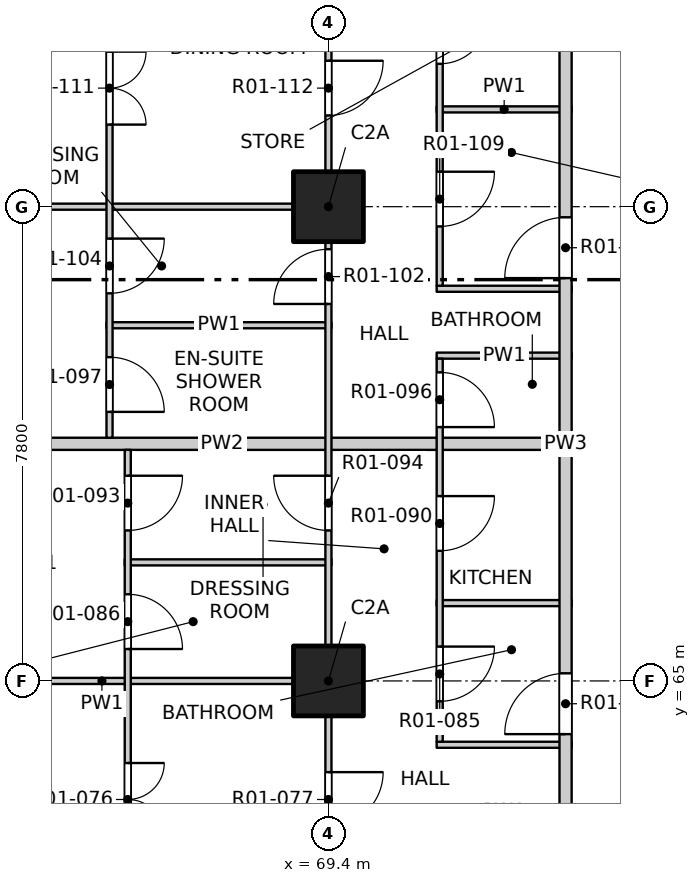
"""IFC4 building model, lengths in metres.
Left out: names, types, materials, properties, quantities, classifications, styles, units other than length and angle.
Written with IfcOpenShell. Run it as: python <this file> out.ifc"""

import sys

from ifc_helpers import new_model, si_unit, direction, frame, frame_2d, origin, origin_2d, place, context, subcontext, project, spatial, rectangle, extrude, element, fill, save


model = new_model("IFC4")
c1 = context("Model", 3, precision=1e-05, world=origin(), true_north=direction((0.0, 1.0)))
c2 = subcontext(c1, "Body", "Model", "MODEL_VIEW")
j1 = project(units=[si_unit("LENGTHUNIT", "METRE"), si_unit("PLANEANGLEUNIT", "RADIAN")], contexts=[c1])
p1 = place(None, origin())
s1 = spatial("IfcSite", under=j1, at=p1, CompositionType="ELEMENT")
p2 = place(p1, origin())
s2 = spatial("IfcBuilding", under=s1, at=p2, CompositionType="ELEMENT")
p3 = place(p2, frame((0.0, 0.0, 26.3)))
s3 = spatial("IfcBuildingStorey", under=s2, at=p3, CompositionType="ELEMENT", Elevation=26.3)
for number, where, z_axis, x_axis in (
    (1, (69.4, 65.0, -0.25), (0.0, 0.0, 1.0), (1.0, 0.0, 0.0)),
    (2, (69.4, 72.8, -0.25), (0.0, 0.0, 1.0), (1.0, 0.0, 0.0)),
):
    element("IfcColumn", number, at=place(p3, frame(where, z_axis=z_axis, x_axis=x_axis)), inside=s3, PredefinedType="COLUMN", context=c2, shape_type="SweptSolid", body=[
        extrude(rectangle(XDim=1.15, YDim=1.15, at=origin_2d()), origin(), (0.0, 0.0, 1.0), 3.4),
    ])
p4 = place(p3, frame((71.18, 63.95, 0.0), z_axis=(0.0, 0.0, 1.0), x_axis=(1.0, 0.0, 0.0)))
e3 = element("IfcWall", 3, at=p4, inside=s3, PredefinedType="PARTITIONING", context=c2, shape_type="SweptSolid", body=[
    extrude(rectangle(XDim=2.22, YDim=0.1, at=frame_2d((1.11, 0.0))), origin(), (0.0, 0.0, 1.0), 3.15),
])
p5 = place(p3, frame((61.9, 65.0, 0.0), z_axis=(0.0, 0.0, 1.0), x_axis=(1.0, 0.0, 0.0)))
e4 = element("IfcWall", 4, at=p5, inside=s3, PredefinedType="PARTITIONING", context=c2, shape_type="SweptSolid", body=[
    extrude(rectangle(XDim=7.55, YDim=0.1, at=frame_2d((3.775, 0.0))), origin(), (0.0, 0.0, 1.0), 2.55),
])
p6 = place(p3, frame((71.18, 66.28, 0.0), z_axis=(0.0, 0.0, 1.0), x_axis=(1.0, 0.0, 0.0)))
e5 = element("IfcWall", 5, at=p6, inside=s3, PredefinedType="PARTITIONING", context=c2, shape_type="SweptSolid", body=[
    extrude(rectangle(XDim=2.22, YDim=0.1, at=frame_2d((1.11, 0.0))), origin(), (0.0, 0.0, 1.0), 3.15),
])
p7 = place(p3, frame((66.05, 66.95, 0.0), z_axis=(0.0, 0.0, 1.0), x_axis=(1.0, 0.0, 0.0)))
e6 = element("IfcWall", 6, at=p7, inside=s3, PredefinedType="PARTITIONING", context=c2, shape_type="SweptSolid", body=[
    extrude(rectangle(XDim=3.4, YDim=0.1, at=frame_2d((1.7, 0.0))), origin(), (0.0, 0.0, 1.0), 3.15),
])
p8 = place(p3, frame((61.9, 68.9, 0.0), z_axis=(0.0, 0.0, 1.0), x_axis=(1.0, 0.0, 0.0)))
e7 = element("IfcWall", 7, at=p8, inside=s3, PredefinedType="PARTITIONING", context=c2, shape_type="SweptSolid", body=[
    extrude(rectangle(XDim=11.5, YDim=0.2, at=frame_2d((5.75, 0.0))), origin(), (0.0, 0.0, 1.0), 3.15),
])
p9 = place(p3, frame((71.18, 70.35, 0.0), z_axis=(0.0, 0.0, 1.0), x_axis=(1.0, 0.0, 0.0)))
e8 = element("IfcWall", 8, at=p9, inside=s3, PredefinedType="PARTITIONING", context=c2, shape_type="SweptSolid", body=[
    extrude(rectangle(XDim=2.22, YDim=0.1, at=frame_2d((1.11, 0.0))), origin(), (0.0, 0.0, 1.0), 3.15),
])
p10 = place(p3, frame((65.75, 70.85, 0.0), z_axis=(0.0, 0.0, 1.0), x_axis=(1.0, 0.0, 0.0)))
e9 = element("IfcWall", 9, at=p10, inside=s3, PredefinedType="PARTITIONING", context=c2, shape_type="SweptSolid", body=[
    extrude(rectangle(XDim=3.7, YDim=0.1, at=frame_2d((1.85, 0.0))), origin(), (0.0, 0.0, 1.0), 3.15),
])
p11 = place(p3, frame((71.18, 71.45, 0.0), z_axis=(0.0, 0.0, 1.0), x_axis=(1.0, 0.0, 0.0)))
e10 = element("IfcWall", 10, at=p11, inside=s3, PredefinedType="PARTITIONING", context=c2, shape_type="SweptSolid", body=[
    extrude(rectangle(XDim=2.22, YDim=0.1, at=frame_2d((1.11, 0.0))), origin(), (0.0, 0.0, 1.0), 3.15),
])
p12 = place(p3, frame((61.9, 72.8, 0.0), z_axis=(0.0, 0.0, 1.0), x_axis=(1.0, 0.0, 0.0)))
e11 = element("IfcWall", 11, at=p12, inside=s3, PredefinedType="PARTITIONING", context=c2, shape_type="SweptSolid", body=[
    extrude(rectangle(XDim=7.55, YDim=0.1, at=frame_2d((3.775, 0.0))), origin(), (0.0, 0.0, 1.0), 2.55),
])
p13 = place(p3, frame((71.18, 74.4, 0.0), z_axis=(0.0, 0.0, 1.0), x_axis=(1.0, 0.0, 0.0)))
e12 = element("IfcWall", 12, at=p13, inside=s3, PredefinedType="PARTITIONING", context=c2, shape_type="SweptSolid", body=[
    extrude(rectangle(XDim=2.22, YDim=0.1, at=frame_2d((1.11, 0.0))), origin(), (0.0, 0.0, 1.0), 3.15),
])
p14 = place(p3, frame((65.8, 69.0, 0.0), z_axis=(0.0, 0.0, 1.0), x_axis=(0.0, 1.0, 0.0)))
e13 = element("IfcWall", 13, at=p14, inside=s3, PredefinedType="PARTITIONING", context=c2, shape_type="SweptSolid", body=[
    extrude(rectangle(XDim=7.6, YDim=0.1, at=frame_2d((3.8, 0.0))), origin(), (0.0, 0.0, 1.0), 3.15),
])
p15 = place(p14, frame((0.425, 0.0, 0.0)))
e14 = element("IfcOpeningElement", 14, at=p15, cuts=e13, PredefinedType="OPENING", context=c2, shape_type="SweptSolid", body=[
    extrude(rectangle(XDim=0.9, YDim=2.1, at=frame_2d((0.45, 1.05))), frame((0.0, 0.06, 0.0), z_axis=(0.0, -1.0, 0.0), x_axis=(1.0, 0.0, 0.0)), (0.0, 0.0, 1.0), 0.12),
])
p16 = place(p14, frame((2.375, 0.0, 0.0)))
e15 = element("IfcOpeningElement", 15, at=p16, cuts=e13, PredefinedType="OPENING", context=c2, shape_type="SweptSolid", body=[
    extrude(rectangle(XDim=0.9, YDim=2.1, at=frame_2d((0.45, 1.05))), frame((0.0, 0.06, 0.0), z_axis=(0.0, -1.0, 0.0), x_axis=(1.0, 0.0, 0.0)), (0.0, 0.0, 1.0), 0.12),
])
p17 = place(p14, frame((5.15, 0.0, 0.0)))
e16 = element("IfcOpeningElement", 16, at=p17, cuts=e13, PredefinedType="OPENING", context=c2, shape_type="SweptSolid", body=[
    extrude(rectangle(XDim=1.2, YDim=2.1, at=frame_2d((0.6, 1.05))), frame((0.0, 0.06, 0.0), z_axis=(0.0, -1.0, 0.0), x_axis=(1.0, 0.0, 0.0)), (0.0, 0.0, 1.0), 0.12),
])
p18 = place(p3, frame((66.1, 61.2, 0.0), z_axis=(0.0, 0.0, 1.0), x_axis=(0.0, 1.0, 0.0)))
e17 = element("IfcWall", 17, at=p18, inside=s3, PredefinedType="PARTITIONING", context=c2, shape_type="SweptSolid", body=[
    extrude(rectangle(XDim=7.6, YDim=0.1, at=frame_2d((3.8, 0.0))), origin(), (0.0, 0.0, 1.0), 3.15),
])
p19 = place(p18, frame((1.25, 0.0, 0.0)))
e18 = element("IfcOpeningElement", 18, at=p19, cuts=e17, PredefinedType="OPENING", context=c2, shape_type="SweptSolid", body=[
    extrude(rectangle(XDim=1.2, YDim=2.1, at=frame_2d((0.6, 1.05))), frame((0.0, 0.06, 0.0), z_axis=(0.0, -1.0, 0.0), x_axis=(1.0, 0.0, 0.0)), (0.0, 0.0, 1.0), 0.12),
])
p20 = place(p18, frame((4.325, 0.0, 0.0)))
e19 = element("IfcOpeningElement", 19, at=p20, cuts=e17, PredefinedType="OPENING", context=c2, shape_type="SweptSolid", body=[
    extrude(rectangle(XDim=0.9, YDim=2.1, at=frame_2d((0.45, 1.05))), frame((0.0, 0.06, 0.0), z_axis=(0.0, -1.0, 0.0), x_axis=(1.0, 0.0, 0.0)), (0.0, 0.0, 1.0), 0.12),
])
p21 = place(p18, frame((6.275, 0.0, 0.0)))
e20 = element("IfcOpeningElement", 20, at=p21, cuts=e17, PredefinedType="OPENING", context=c2, shape_type="SweptSolid", body=[
    extrude(rectangle(XDim=0.9, YDim=2.1, at=frame_2d((0.45, 1.05))), frame((0.0, 0.06, 0.0), z_axis=(0.0, -1.0, 0.0), x_axis=(1.0, 0.0, 0.0)), (0.0, 0.0, 1.0), 0.12),
])
p22 = place(p3, frame((69.4, 49.4, 0.0), z_axis=(0.0, 0.0, 1.0), x_axis=(0.0, 1.0, 0.0)))
e21 = element("IfcWall", 21, at=p22, inside=s3, PredefinedType="PARTITIONING", context=c2, shape_type="SweptSolid", body=[
    extrude(rectangle(XDim=31.2, YDim=0.1, at=frame_2d((15.6, 0.0))), origin(), (0.0, 0.0, 1.0), 3.15),
])
p23 = place(p22, frame((1.5, 0.0, 0.0)))
e22 = element("IfcOpeningElement", 22, at=p23, cuts=e21, PredefinedType="OPENING", context=c2, shape_type="SweptSolid", body=[
    extrude(rectangle(XDim=0.9, YDim=2.1, at=frame_2d((0.45, 1.05))), frame((0.0, 0.06, 0.0), z_axis=(0.0, -1.0, 0.0), x_axis=(1.0, 0.0, 0.0)), (0.0, 0.0, 1.0), 0.12),
])
p24 = place(p22, frame((6.225, 0.0, 0.0)))
e23 = element("IfcOpeningElement", 23, at=p24, cuts=e21, PredefinedType="OPENING", context=c2, shape_type="SweptSolid", body=[
    extrude(rectangle(XDim=0.9, YDim=2.1, at=frame_2d((0.45, 1.05))), frame((0.0, 0.06, 0.0), z_axis=(0.0, -1.0, 0.0), x_axis=(1.0, 0.0, 0.0)), (0.0, 0.0, 1.0), 0.12),
])
p25 = place(p22, frame((10.275, 0.0, 0.0)))
e24 = element("IfcOpeningElement", 24, at=p25, cuts=e21, PredefinedType="OPENING", context=c2, shape_type="SweptSolid", body=[
    extrude(rectangle(XDim=0.9, YDim=2.1, at=frame_2d((0.45, 1.05))), frame((0.0, 0.06, 0.0), z_axis=(0.0, -1.0, 0.0), x_axis=(1.0, 0.0, 0.0)), (0.0, 0.0, 1.0), 0.12),
])
p26 = place(p22, frame((13.2, 0.0, 0.0)))
e25 = element("IfcOpeningElement", 25, at=p26, cuts=e21, PredefinedType="OPENING", context=c2, shape_type="SweptSolid", body=[
    extrude(rectangle(XDim=0.9, YDim=2.1, at=frame_2d((0.45, 1.05))), frame((0.0, 0.06, 0.0), z_axis=(0.0, -1.0, 0.0), x_axis=(1.0, 0.0, 0.0)), (0.0, 0.0, 1.0), 0.12),
])
p27 = place(p22, frame((18.075, 0.0, 0.0)))
e26 = element("IfcOpeningElement", 26, at=p27, cuts=e21, PredefinedType="OPENING", context=c2, shape_type="SweptSolid", body=[
    extrude(rectangle(XDim=0.9, YDim=2.1, at=frame_2d((0.45, 1.05))), frame((0.0, 0.06, 0.0), z_axis=(0.0, -1.0, 0.0), x_axis=(1.0, 0.0, 0.0)), (0.0, 0.0, 1.0), 0.12),
])
p28 = place(p22, frame((21.8, 0.0, 0.0)))
e27 = element("IfcOpeningElement", 27, at=p28, cuts=e21, PredefinedType="OPENING", context=c2, shape_type="SweptSolid", body=[
    extrude(rectangle(XDim=0.9, YDim=2.1, at=frame_2d((0.45, 1.05))), frame((0.0, 0.06, 0.0), z_axis=(0.0, -1.0, 0.0), x_axis=(1.0, 0.0, 0.0)), (0.0, 0.0, 1.0), 0.12),
])
p29 = place(p22, frame((24.9, 0.0, 0.0)))
e28 = element("IfcOpeningElement", 28, at=p29, cuts=e21, PredefinedType="OPENING", context=c2, shape_type="SweptSolid", body=[
    extrude(rectangle(XDim=0.9, YDim=2.1, at=frame_2d((0.45, 1.05))), frame((0.0, 0.06, 0.0), z_axis=(0.0, -1.0, 0.0), x_axis=(1.0, 0.0, 0.0)), (0.0, 0.0, 1.0), 0.12),
])
p30 = place(p22, frame((29.6, 0.0, 0.0)))
e29 = element("IfcOpeningElement", 29, at=p30, cuts=e21, PredefinedType="OPENING", context=c2, shape_type="SweptSolid", body=[
    extrude(rectangle(XDim=0.9, YDim=2.1, at=frame_2d((0.45, 1.05))), frame((0.0, 0.06, 0.0), z_axis=(0.0, -1.0, 0.0), x_axis=(1.0, 0.0, 0.0)), (0.0, 0.0, 1.0), 0.12),
])
p31 = place(p3, frame((71.23, 64.0, 0.0), z_axis=(0.0, 0.0, 1.0), x_axis=(0.0, 1.0, 0.0)))
e30 = element("IfcWall", 30, at=p31, inside=s3, PredefinedType="PARTITIONING", context=c2, shape_type="SweptSolid", body=[
    extrude(rectangle(XDim=6.3, YDim=0.1, at=frame_2d((3.15, 0.0))), origin(), (0.0, 0.0, 1.0), 3.15),
])
p32 = place(p31, frame((0.665, 0.0, 0.0)))
e31 = element("IfcOpeningElement", 31, at=p32, cuts=e30, PredefinedType="OPENING", context=c2, shape_type="SweptSolid", body=[
    extrude(rectangle(XDim=0.9, YDim=2.1, at=frame_2d((0.45, 1.05))), frame((0.0, 0.06, 0.0), z_axis=(0.0, -1.0, 0.0), x_axis=(1.0, 0.0, 0.0)), (0.0, 0.0, 1.0), 0.12),
])
p33 = place(p31, frame((3.14, 0.0, 0.0)))
e32 = element("IfcOpeningElement", 32, at=p33, cuts=e30, PredefinedType="OPENING", context=c2, shape_type="SweptSolid", body=[
    extrude(rectangle(XDim=0.9, YDim=2.1, at=frame_2d((0.45, 1.05))), frame((0.0, 0.06, 0.0), z_axis=(0.0, -1.0, 0.0), x_axis=(1.0, 0.0, 0.0)), (0.0, 0.0, 1.0), 0.12),
])
p34 = place(p31, frame((5.175, 0.0, 0.0)))
e33 = element("IfcOpeningElement", 33, at=p34, cuts=e30, PredefinedType="OPENING", context=c2, shape_type="SweptSolid", body=[
    extrude(rectangle(XDim=0.9, YDim=2.1, at=frame_2d((0.45, 1.05))), frame((0.0, 0.06, 0.0), z_axis=(0.0, -1.0, 0.0), x_axis=(1.0, 0.0, 0.0)), (0.0, 0.0, 1.0), 0.12),
])
p35 = place(p3, frame((71.23, 71.5, 0.0), z_axis=(0.0, 0.0, 1.0), x_axis=(0.0, 1.0, 0.0)))
e34 = element("IfcWall", 34, at=p35, inside=s3, PredefinedType="PARTITIONING", context=c2, shape_type="SweptSolid", body=[
    extrude(rectangle(XDim=6.5, YDim=0.1, at=frame_2d((3.25, 0.0))), origin(), (0.0, 0.0, 1.0), 3.15),
])
p36 = place(p35, frame((0.975, 0.0, 0.0)))
e35 = element("IfcOpeningElement", 35, at=p36, cuts=e34, PredefinedType="OPENING", context=c2, shape_type="SweptSolid", body=[
    extrude(rectangle(XDim=0.9, YDim=2.1, at=frame_2d((0.45, 1.05))), frame((0.0, 0.06, 0.0), z_axis=(0.0, -1.0, 0.0), x_axis=(1.0, 0.0, 0.0)), (0.0, 0.0, 1.0), 0.12),
])
p37 = place(p35, frame((3.65, 0.0, 0.0)))
e36 = element("IfcOpeningElement", 36, at=p37, cuts=e34, PredefinedType="OPENING", context=c2, shape_type="SweptSolid", body=[
    extrude(rectangle(XDim=0.8, YDim=2.1, at=frame_2d((0.4, 1.05))), frame((0.0, 0.06, 0.0), z_axis=(0.0, -1.0, 0.0), x_axis=(1.0, 0.0, 0.0)), (0.0, 0.0, 1.0), 0.12),
])
p38 = place(p35, frame((5.475, 0.0, 0.0)))
e37 = element("IfcOpeningElement", 37, at=p38, cuts=e34, PredefinedType="OPENING", context=c2, shape_type="SweptSolid", body=[
    extrude(rectangle(XDim=0.8, YDim=2.1, at=frame_2d((0.4, 1.05))), frame((0.0, 0.06, 0.0), z_axis=(0.0, -1.0, 0.0), x_axis=(1.0, 0.0, 0.0)), (0.0, 0.0, 1.0), 0.12),
])
p39 = place(p3, frame((73.3, 53.4, 0.0), z_axis=(0.0, 0.0, 1.0), x_axis=(0.0, 1.0, 0.0)))
e38 = element("IfcWall", 38, at=p39, inside=s3, PredefinedType="PARTITIONING", context=c2, shape_type="SweptSolid", body=[
    extrude(rectangle(XDim=31.0, YDim=0.2, at=frame_2d((15.5, 0.0))), origin(), (0.0, 0.0, 1.0), 3.15),
])
p40 = place(p39, frame((2.325, 0.0, 0.0)))
e39 = element("IfcOpeningElement", 39, at=p40, cuts=e38, PredefinedType="OPENING", context=c2, shape_type="SweptSolid", body=[
    extrude(rectangle(XDim=1.0, YDim=2.1, at=frame_2d((0.5, 1.05))), frame((0.0, 0.11, 0.0), z_axis=(0.0, -1.0, 0.0), x_axis=(1.0, 0.0, 0.0)), (0.0, 0.0, 1.0), 0.22),
])
p41 = place(p39, frame((10.725, 0.0, 0.0)))
e40 = element("IfcOpeningElement", 40, at=p41, cuts=e38, PredefinedType="OPENING", context=c2, shape_type="SweptSolid", body=[
    extrude(rectangle(XDim=1.0, YDim=2.1, at=frame_2d((0.5, 1.05))), frame((0.0, 0.11, 0.0), z_axis=(0.0, -1.0, 0.0), x_axis=(1.0, 0.0, 0.0)), (0.0, 0.0, 1.0), 0.22),
])
p42 = place(p39, frame((18.225, 0.0, 0.0)))
e41 = element("IfcOpeningElement", 41, at=p42, cuts=e38, PredefinedType="OPENING", context=c2, shape_type="SweptSolid", body=[
    extrude(rectangle(XDim=1.0, YDim=2.1, at=frame_2d((0.5, 1.05))), frame((0.0, 0.11, 0.0), z_axis=(0.0, -1.0, 0.0), x_axis=(1.0, 0.0, 0.0)), (0.0, 0.0, 1.0), 0.22),
])
p43 = place(p39, frame((25.925, 0.0, 0.0)))
e42 = element("IfcOpeningElement", 42, at=p43, cuts=e38, PredefinedType="OPENING", context=c2, shape_type="SweptSolid", body=[
    extrude(rectangle(XDim=1.0, YDim=2.1, at=frame_2d((0.5, 1.05))), frame((0.0, 0.11, 0.0), z_axis=(0.0, -1.0, 0.0), x_axis=(1.0, 0.0, 0.0)), (0.0, 0.0, 1.0), 0.22),
])
p44 = place(p19, origin())
e43 = element("IfcDoor", 43, at=p44, inside=s3, OperationType="DOUBLE_DOOR_SINGLE_SWING", PredefinedType="DOOR", context=c2, shape_type="SweptSolid", body=[
    extrude(rectangle(XDim=1.2, YDim=2.1, at=frame_2d((0.6, 1.05))), frame((0.0, 0.025, 0.0), z_axis=(0.0, -1.0, 0.0), x_axis=(1.0, 0.0, 0.0)), (0.0, 0.0, 1.0), 0.05),
])
fill(e18, e43)
p45 = place(p26, origin())
e44 = element("IfcDoor", 44, at=p45, inside=s3, OperationType="SINGLE_SWING_LEFT", PredefinedType="DOOR", context=c2, shape_type="SweptSolid", body=[
    extrude(rectangle(XDim=0.9, YDim=2.1, at=frame_2d((0.45, 1.05))), frame((0.0, 0.025, 0.0), z_axis=(0.0, -1.0, 0.0), x_axis=(1.0, 0.0, 0.0)), (0.0, 0.0, 1.0), 0.05),
])
fill(e25, e44)
p46 = place(p41, origin())
e45 = element("IfcDoor", 45, at=p46, inside=s3, OperationType="SINGLE_SWING_RIGHT", PredefinedType="DOOR", context=c2, shape_type="SweptSolid", body=[
    extrude(rectangle(XDim=1.0, YDim=2.1, at=frame_2d((0.5, 1.05))), frame((0.0, 0.025, 0.0), z_axis=(0.0, -1.0, 0.0), x_axis=(1.0, 0.0, 0.0)), (0.0, 0.0, 1.0), 0.05),
])
fill(e40, e45)
p47 = place(p32, origin())
e46 = element("IfcDoor", 46, at=p47, inside=s3, OperationType="SINGLE_SWING_LEFT", PredefinedType="DOOR", context=c2, shape_type="SweptSolid", body=[
    extrude(rectangle(XDim=0.9, YDim=2.1, at=frame_2d((0.45, 1.05))), frame((0.0, 0.025, 0.0), z_axis=(0.0, -1.0, 0.0), x_axis=(1.0, 0.0, 0.0)), (0.0, 0.0, 1.0), 0.05),
])
fill(e31, e46)
p48 = place(p20, origin())
e47 = element("IfcDoor", 47, at=p48, inside=s3, OperationType="SINGLE_SWING_RIGHT", PredefinedType="DOOR", context=c2, shape_type="SweptSolid", body=[
    extrude(rectangle(XDim=0.9, YDim=2.1, at=frame_2d((0.45, 1.05))), frame((0.0, 0.025, 0.0), z_axis=(0.0, -1.0, 0.0), x_axis=(1.0, 0.0, 0.0)), (0.0, 0.0, 1.0), 0.05),
])
fill(e19, e47)
p49 = place(p33, origin())
e48 = element("IfcDoor", 48, at=p49, inside=s3, OperationType="SINGLE_SWING_LEFT", PredefinedType="DOOR", context=c2, shape_type="SweptSolid", body=[
    extrude(rectangle(XDim=0.9, YDim=2.1, at=frame_2d((0.45, 1.05))), frame((0.0, 0.025, 0.0), z_axis=(0.0, -1.0, 0.0), x_axis=(1.0, 0.0, 0.0)), (0.0, 0.0, 1.0), 0.05),
])
fill(e32, e48)
p50 = place(p21, origin())
e49 = element("IfcDoor", 49, at=p50, inside=s3, OperationType="SINGLE_SWING_LEFT", PredefinedType="DOOR", context=c2, shape_type="SweptSolid", body=[
    extrude(rectangle(XDim=0.9, YDim=2.1, at=frame_2d((0.45, 1.05))), frame((0.0, 0.025, 0.0), z_axis=(0.0, -1.0, 0.0), x_axis=(1.0, 0.0, 0.0)), (0.0, 0.0, 1.0), 0.05),
])
fill(e20, e49)
p51 = place(p27, origin())
e50 = element("IfcDoor", 50, at=p51, inside=s3, OperationType="SINGLE_SWING_RIGHT", PredefinedType="DOOR", context=c2, shape_type="SweptSolid", body=[
    extrude(rectangle(XDim=0.9, YDim=2.1, at=frame_2d((0.45, 1.05))), frame((0.0, 0.025, 0.0), z_axis=(0.0, -1.0, 0.0), x_axis=(1.0, 0.0, 0.0)), (0.0, 0.0, 1.0), 0.05),
])
fill(e26, e50)
p52 = place(p34, origin())
e51 = element("IfcDoor", 51, at=p52, inside=s3, OperationType="SINGLE_SWING_RIGHT", PredefinedType="DOOR", context=c2, shape_type="SweptSolid", body=[
    extrude(rectangle(XDim=0.9, YDim=2.1, at=frame_2d((0.45, 1.05))), frame((0.0, 0.025, 0.0), z_axis=(0.0, -1.0, 0.0), x_axis=(1.0, 0.0, 0.0)), (0.0, 0.0, 1.0), 0.05),
])
fill(e33, e51)
p53 = place(p15, origin())
e52 = element("IfcDoor", 52, at=p53, inside=s3, OperationType="SINGLE_SWING_RIGHT", PredefinedType="DOOR", context=c2, shape_type="SweptSolid", body=[
    extrude(rectangle(XDim=0.9, YDim=2.1, at=frame_2d((0.45, 1.05))), frame((0.0, 0.025, 0.0), z_axis=(0.0, -1.0, 0.0), x_axis=(1.0, 0.0, 0.0)), (0.0, 0.0, 1.0), 0.05),
])
fill(e14, e52)
p54 = place(p28, origin())
e53 = element("IfcDoor", 53, at=p54, inside=s3, OperationType="SINGLE_SWING_LEFT", PredefinedType="DOOR", context=c2, shape_type="SweptSolid", body=[
    extrude(rectangle(XDim=0.9, YDim=2.1, at=frame_2d((0.45, 1.05))), frame((0.0, 0.025, 0.0), z_axis=(0.0, -1.0, 0.0), x_axis=(1.0, 0.0, 0.0)), (0.0, 0.0, 1.0), 0.05),
])
fill(e27, e53)
p55 = place(p16, origin())
e54 = element("IfcDoor", 54, at=p55, inside=s3, OperationType="SINGLE_SWING_LEFT", PredefinedType="DOOR", context=c2, shape_type="SweptSolid", body=[
    extrude(rectangle(XDim=0.9, YDim=2.1, at=frame_2d((0.45, 1.05))), frame((0.0, 0.025, 0.0), z_axis=(0.0, -1.0, 0.0), x_axis=(1.0, 0.0, 0.0)), (0.0, 0.0, 1.0), 0.05),
])
fill(e15, e54)
p56 = place(p42, origin())
e55 = element("IfcDoor", 55, at=p56, inside=s3, OperationType="SINGLE_SWING_RIGHT", PredefinedType="DOOR", context=c2, shape_type="SweptSolid", body=[
    extrude(rectangle(XDim=1.0, YDim=2.1, at=frame_2d((0.5, 1.05))), frame((0.0, 0.025, 0.0), z_axis=(0.0, -1.0, 0.0), x_axis=(1.0, 0.0, 0.0)), (0.0, 0.0, 1.0), 0.05),
])
fill(e41, e55)
p57 = place(p36, origin())
e56 = element("IfcDoor", 56, at=p57, inside=s3, OperationType="SINGLE_SWING_LEFT", PredefinedType="DOOR", context=c2, shape_type="SweptSolid", body=[
    extrude(rectangle(XDim=0.9, YDim=2.1, at=frame_2d((0.45, 1.05))), frame((0.0, 0.025, 0.0), z_axis=(0.0, -1.0, 0.0), x_axis=(1.0, 0.0, 0.0)), (0.0, 0.0, 1.0), 0.05),
])
fill(e35, e56)
p58 = place(p17, origin())
e57 = element("IfcDoor", 57, at=p58, inside=s3, OperationType="DOUBLE_DOOR_SINGLE_SWING", PredefinedType="DOOR", context=c2, shape_type="SweptSolid", body=[
    extrude(rectangle(XDim=1.2, YDim=2.1, at=frame_2d((0.6, 1.05))), frame((0.0, 0.025, 0.0), z_axis=(0.0, -1.0, 0.0), x_axis=(1.0, 0.0, 0.0)), (0.0, 0.0, 1.0), 0.05),
])
fill(e16, e57)
p59 = place(p29, origin())
e58 = element("IfcDoor", 58, at=p59, inside=s3, OperationType="SINGLE_SWING_LEFT", PredefinedType="DOOR", context=c2, shape_type="SweptSolid", body=[
    extrude(rectangle(XDim=0.9, YDim=2.1, at=frame_2d((0.45, 1.05))), frame((0.0, 0.025, 0.0), z_axis=(0.0, -1.0, 0.0), x_axis=(1.0, 0.0, 0.0)), (0.0, 0.0, 1.0), 0.05),
])
fill(e28, e58)
p60 = place(p37, origin())
e59 = element("IfcDoor", 59, at=p60, inside=s3, OperationType="SINGLE_SWING_LEFT", PredefinedType="DOOR", context=c2, shape_type="SweptSolid", body=[
    extrude(rectangle(XDim=0.8, YDim=2.1, at=frame_2d((0.4, 1.05))), frame((0.0, 0.025, 0.0), z_axis=(0.0, -1.0, 0.0), x_axis=(1.0, 0.0, 0.0)), (0.0, 0.0, 1.0), 0.05),
])
fill(e36, e59)
save(model, sys.argv[1])
